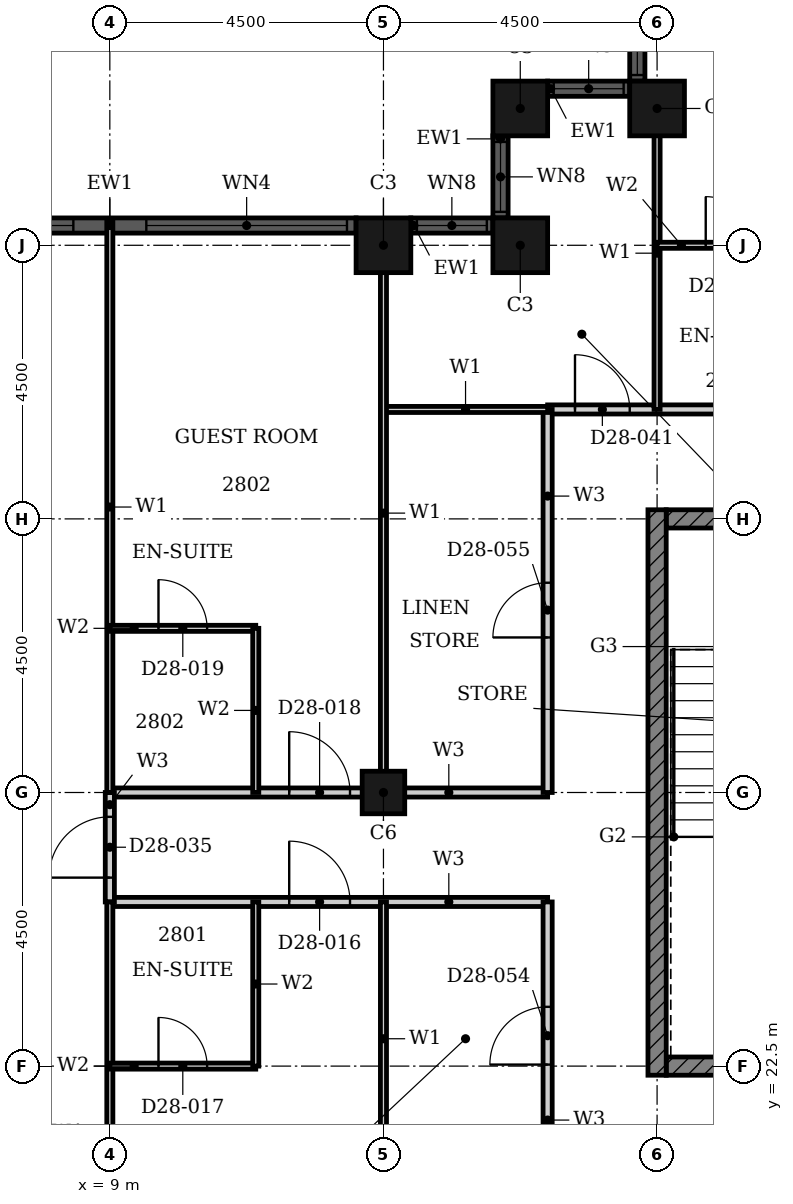
"""IFC4 building model, lengths in metres.
Left out: names, types, materials, properties, quantities, classifications, styles, units other than length and angle.
Written with IfcOpenShell. Run it as: python <this file> out.ifc"""

import sys

from ifc_helpers import new_model, si_unit, direction, frame, frame_2d, origin, origin_2d, place, context, subcontext, project, spatial, rectangle, hollow_rectangle, extrude, element, fill, save


model = new_model("IFC4")
c1 = context("Model", 3, precision=1e-05, world=origin(), true_north=direction((0.0, 1.0)))
c2 = subcontext(c1, "Body", "Model", "MODEL_VIEW")
j1 = project(units=[si_unit("LENGTHUNIT", "METRE"), si_unit("PLANEANGLEUNIT", "RADIAN")], contexts=[c1])
p1 = place(None, origin())
s1 = spatial("IfcSite", under=j1, at=p1, CompositionType="ELEMENT")
p2 = place(p1, origin())
s2 = spatial("IfcBuilding", under=s1, at=p2, CompositionType="ELEMENT")
p3 = place(p2, frame((0.0, 0.0, 115.2)))
s3 = spatial("IfcBuildingStorey", under=s2, at=p3, CompositionType="ELEMENT", Elevation=115.2)
for number, where, z_axis, x_axis in (
    (1, (18.0, 38.25, 0.0), (0.0, 0.0, 1.0), (1.0, 0.0, 0.0)),
    (2, (15.75, 38.25, 0.0), (0.0, 0.0, 1.0), (1.0, 0.0, 0.0)),
    (3, (15.75, 36.0, 0.0), (0.0, 0.0, 1.0), (1.0, 0.0, 0.0)),
    (4, (13.5, 36.0, 0.0), (0.0, 0.0, 1.0), (1.0, 0.0, 0.0)),
):
    element("IfcColumn", number, at=place(p3, frame(where, z_axis=z_axis, x_axis=x_axis)), inside=s3, PredefinedType="COLUMN", context=c2, shape_type="SweptSolid", body=[
        extrude(hollow_rectangle(XDim=0.9, YDim=0.9, WallThickness=0.028, at=origin_2d()), origin(), (0.0, 0.0, 1.0), 3.6),
    ])
p4 = place(p3, frame((13.5, 27.0, 0.0), z_axis=(0.0, 0.0, 1.0), x_axis=(1.0, 0.0, 0.0)))
e5 = element("IfcColumn", 5, at=p4, inside=s3, PredefinedType="COLUMN", context=c2, shape_type="SweptSolid", body=[
    extrude(hollow_rectangle(XDim=0.7, YDim=0.7, WallThickness=0.022, at=origin_2d()), origin(), (0.0, 0.0, 1.0), 3.6),
])
p5 = place(p3, frame((17.675, 40.05, 0.0), z_axis=(0.0, 0.0, 1.0), x_axis=(0.0, -1.0, 0.0)))
e6 = element("IfcWall", 6, at=p5, inside=s3, PredefinedType="SOLIDWALL", context=c2, shape_type="SweptSolid", body=[
    extrude(rectangle(XDim=1.35, YDim=0.25, at=frame_2d((0.675, 0.0))), origin(), (0.0, 0.0, 1.0), 3.6),
])
p6 = place(p5, frame((0.1, 0.0, 0.9)))
e7 = element("IfcOpeningElement", 7, at=p6, cuts=e6, PredefinedType="OPENING", context=c2, shape_type="SweptSolid", body=[
    extrude(rectangle(XDim=1.15, YDim=2.08, at=frame_2d((0.575, 1.04))), frame((0.0, 0.135, 0.0), z_axis=(0.0, -1.0, 0.0), x_axis=(1.0, 0.0, 0.0)), (0.0, 0.0, 1.0), 0.27),
])
p7 = place(p3, frame((17.55, 38.575, 0.0), z_axis=(0.0, 0.0, 1.0), x_axis=(-1.0, 0.0, 0.0)))
e8 = element("IfcWall", 8, at=p7, inside=s3, PredefinedType="SOLIDWALL", context=c2, shape_type="SweptSolid", body=[
    extrude(rectangle(XDim=1.35, YDim=0.25, at=frame_2d((0.675, 0.0))), origin(), (0.0, 0.0, 1.0), 3.6),
])
p8 = place(p7, frame((0.1, 0.0, 0.9)))
e9 = element("IfcOpeningElement", 9, at=p8, cuts=e8, PredefinedType="OPENING", context=c2, shape_type="SweptSolid", body=[
    extrude(rectangle(XDim=1.15, YDim=2.08, at=frame_2d((0.575, 1.04))), frame((0.0, 0.135, 0.0), z_axis=(0.0, -1.0, 0.0), x_axis=(1.0, 0.0, 0.0)), (0.0, 0.0, 1.0), 0.27),
])
p9 = place(p3, frame((15.425, 37.8, 0.0), z_axis=(0.0, 0.0, 1.0), x_axis=(0.0, -1.0, 0.0)))
e10 = element("IfcWall", 10, at=p9, inside=s3, PredefinedType="SOLIDWALL", context=c2, shape_type="SweptSolid", body=[
    extrude(rectangle(XDim=1.35, YDim=0.25, at=frame_2d((0.675, 0.0))), origin(), (0.0, 0.0, 1.0), 3.6),
])
p10 = place(p9, frame((0.1, 0.0, 0.9)))
e11 = element("IfcOpeningElement", 11, at=p10, cuts=e10, PredefinedType="OPENING", context=c2, shape_type="SweptSolid", body=[
    extrude(rectangle(XDim=1.15, YDim=2.08, at=frame_2d((0.575, 1.04))), frame((0.0, 0.135, 0.0), z_axis=(0.0, -1.0, 0.0), x_axis=(1.0, 0.0, 0.0)), (0.0, 0.0, 1.0), 0.27),
])
p11 = place(p3, frame((15.3, 36.325, 0.0), z_axis=(0.0, 0.0, 1.0), x_axis=(-1.0, 0.0, 0.0)))
e12 = element("IfcWall", 12, at=p11, inside=s3, PredefinedType="SOLIDWALL", context=c2, shape_type="SweptSolid", body=[
    extrude(rectangle(XDim=1.35, YDim=0.25, at=frame_2d((0.675, 0.0))), origin(), (0.0, 0.0, 1.0), 3.6),
])
p12 = place(p11, frame((0.1, 0.0, 0.9)))
e13 = element("IfcOpeningElement", 13, at=p12, cuts=e12, PredefinedType="OPENING", context=c2, shape_type="SweptSolid", body=[
    extrude(rectangle(XDim=1.15, YDim=2.08, at=frame_2d((0.575, 1.04))), frame((0.0, 0.135, 0.0), z_axis=(0.0, -1.0, 0.0), x_axis=(1.0, 0.0, 0.0)), (0.0, 0.0, 1.0), 0.27),
])
p13 = place(p3, frame((13.05, 36.325, 0.0), z_axis=(0.0, 0.0, 1.0), x_axis=(-1.0, 0.0, 0.0)))
e14 = element("IfcWall", 14, at=p13, inside=s3, PredefinedType="SOLIDWALL", context=c2, shape_type="SweptSolid", body=[
    extrude(rectangle(XDim=8.1, YDim=0.25, at=frame_2d((4.05, 0.0))), origin(), (0.0, 0.0, 1.0), 3.6),
])
p14 = place(p13, frame((0.15, 0.0, 0.9)))
e15 = element("IfcOpeningElement", 15, at=p14, cuts=e14, PredefinedType="OPENING", context=c2, shape_type="SweptSolid", body=[
    extrude(rectangle(XDim=3.3, YDim=2.08, at=frame_2d((1.65, 1.04))), frame((0.0, 0.135, 0.0), z_axis=(0.0, -1.0, 0.0), x_axis=(1.0, 0.0, 0.0)), (0.0, 0.0, 1.0), 0.27),
])
p15 = place(p13, frame((4.65, 0.0, 0.9)))
e16 = element("IfcOpeningElement", 16, at=p15, cuts=e14, PredefinedType="OPENING", context=c2, shape_type="SweptSolid", body=[
    extrude(rectangle(XDim=3.3, YDim=2.08, at=frame_2d((1.65, 1.04))), frame((0.0, 0.135, 0.0), z_axis=(0.0, -1.0, 0.0), x_axis=(1.0, 0.0, 0.0)), (0.0, 0.0, 1.0), 0.27),
])
p16 = place(p3, frame((18.15, 22.5, 0.0), z_axis=(0.0, 0.0, 1.0), x_axis=(1.0, 0.0, 0.0)))
e17 = element("IfcWall", 17, at=p16, inside=s3, PredefinedType="SHEAR", context=c2, shape_type="SweptSolid", body=[
    extrude(rectangle(XDim=4.225, YDim=0.3, at=frame_2d((2.113, 0.0))), origin(), (0.0, 0.0, 1.0), 3.3),
])
p17 = place(p3, frame((18.15, 31.5, 0.0), z_axis=(0.0, 0.0, 1.0), x_axis=(1.0, 0.0, 0.0)))
e18 = element("IfcWall", 18, at=p17, inside=s3, PredefinedType="SHEAR", context=c2, shape_type="SweptSolid", body=[
    extrude(rectangle(XDim=6.797, YDim=0.3, at=frame_2d((3.398, 0.0))), origin(), (0.0, 0.0, 1.0), 3.3),
])
p18 = place(p17, frame((4.736, 0.0, 0.0)))
e19 = element("IfcOpeningElement", 19, at=p18, cuts=e18, PredefinedType="OPENING", context=c2, shape_type="SweptSolid", body=[
    extrude(rectangle(XDim=1.8, YDim=2.1, at=frame_2d((0.9, 1.05))), frame((0.0, 0.16, 0.0), z_axis=(0.0, -1.0, 0.0), x_axis=(1.0, 0.0, 0.0)), (0.0, 0.0, 1.0), 0.32),
])
p19 = place(p3, frame((18.0, 22.35, 0.0), z_axis=(0.0, 0.0, 1.0), x_axis=(0.0, 1.0, 0.0)))
e20 = element("IfcWall", 20, at=p19, inside=s3, PredefinedType="SHEAR", context=c2, shape_type="SweptSolid", body=[
    extrude(rectangle(XDim=9.3, YDim=0.3, at=frame_2d((4.65, 0.0))), origin(), (0.0, 0.0, 1.0), 3.3),
])
p20 = place(p3, frame((9.0, 25.2, 0.0), z_axis=(0.0, 0.0, 1.0), x_axis=(1.0, 0.0, 0.0)))
e21 = element("IfcWall", 21, at=p20, inside=s3, PredefinedType="PARTITIONING", context=c2, shape_type="SweptSolid", body=[
    extrude(rectangle(XDim=7.2, YDim=0.15, at=frame_2d((3.6, 0.0))), origin(), (0.0, 0.0, 1.0), 3.3),
])
p21 = place(p20, frame((2.95, 0.0, 0.0)))
e22 = element("IfcOpeningElement", 22, at=p21, cuts=e21, PredefinedType="OPENING", context=c2, shape_type="SweptSolid", body=[
    extrude(rectangle(XDim=1.0, YDim=2.1, at=frame_2d((0.5, 1.05))), frame((0.0, 0.085, 0.0), z_axis=(0.0, -1.0, 0.0), x_axis=(1.0, 0.0, 0.0)), (0.0, 0.0, 1.0), 0.17),
])
p22 = place(p3, frame((9.0, 27.0, 0.0), z_axis=(0.0, 0.0, 1.0), x_axis=(1.0, 0.0, 0.0)))
e23 = element("IfcWall", 23, at=p22, inside=s3, PredefinedType="PARTITIONING", context=c2, shape_type="SweptSolid", body=[
    extrude(rectangle(XDim=7.2, YDim=0.15, at=frame_2d((3.6, 0.0))), origin(), (0.0, 0.0, 1.0), 2.58),
])
p23 = place(p22, frame((2.95, 0.0, 0.0)))
e24 = element("IfcOpeningElement", 24, at=p23, cuts=e23, PredefinedType="OPENING", context=c2, shape_type="SweptSolid", body=[
    extrude(rectangle(XDim=1.0, YDim=2.1, at=frame_2d((0.5, 1.05))), frame((0.0, 0.085, 0.0), z_axis=(0.0, -1.0, 0.0), x_axis=(1.0, 0.0, 0.0)), (0.0, 0.0, 1.0), 0.17),
])
p24 = place(p3, frame((16.2, 33.3, 0.0), z_axis=(0.0, 0.0, 1.0), x_axis=(1.0, 0.0, 0.0)))
e25 = element("IfcWall", 25, at=p24, inside=s3, PredefinedType="PARTITIONING", context=c2, shape_type="SweptSolid", body=[
    extrude(rectangle(XDim=15.3, YDim=0.15, at=frame_2d((7.65, 0.0))), origin(), (0.0, 0.0, 1.0), 3.3),
])
p25 = place(p24, frame((4.75, 0.0, 0.0)))
e26 = element("IfcOpeningElement", 26, at=p25, cuts=e25, PredefinedType="OPENING", context=c2, shape_type="SweptSolid", body=[
    extrude(rectangle(XDim=1.0, YDim=2.1, at=frame_2d((0.5, 1.05))), frame((0.0, 0.085, 0.0), z_axis=(0.0, -1.0, 0.0), x_axis=(1.0, 0.0, 0.0)), (0.0, 0.0, 1.0), 0.17),
])
p26 = place(p24, frame((0.45, 0.0, 0.0)))
e27 = element("IfcOpeningElement", 27, at=p26, cuts=e25, PredefinedType="OPENING", context=c2, shape_type="SweptSolid", body=[
    extrude(rectangle(XDim=0.9, YDim=2.1, at=frame_2d((0.45, 1.05))), frame((0.0, 0.085, 0.0), z_axis=(0.0, -1.0, 0.0), x_axis=(1.0, 0.0, 0.0)), (0.0, 0.0, 1.0), 0.17),
])
p27 = place(p24, frame((10.35, 0.0, 0.0)))
e28 = element("IfcOpeningElement", 28, at=p27, cuts=e25, PredefinedType="OPENING", context=c2, shape_type="SweptSolid", body=[
    extrude(rectangle(XDim=0.9, YDim=2.1, at=frame_2d((0.45, 1.05))), frame((0.0, 0.085, 0.0), z_axis=(0.0, -1.0, 0.0), x_axis=(1.0, 0.0, 0.0)), (0.0, 0.0, 1.0), 0.17),
])
p28 = place(p3, frame((16.2, 27.0, 0.0), z_axis=(0.0, 0.0, 1.0), x_axis=(0.0, 1.0, 0.0)))
e29 = element("IfcWall", 29, at=p28, inside=s3, PredefinedType="PARTITIONING", context=c2, shape_type="SweptSolid", body=[
    extrude(rectangle(XDim=6.3, YDim=0.15, at=frame_2d((3.15, 0.0))), origin(), (0.0, 0.0, 1.0), 3.3),
])
p29 = place(p28, frame((2.55, 0.0, 0.0)))
e30 = element("IfcOpeningElement", 30, at=p29, cuts=e29, PredefinedType="OPENING", context=c2, shape_type="SweptSolid", body=[
    extrude(rectangle(XDim=0.9, YDim=2.1, at=frame_2d((0.45, 1.05))), frame((0.0, 0.085, 0.0), z_axis=(0.0, -1.0, 0.0), x_axis=(1.0, 0.0, 0.0)), (0.0, 0.0, 1.0), 0.17),
])
p30 = place(p3, frame((16.2, 20.7, 0.0), z_axis=(0.0, 0.0, 1.0), x_axis=(0.0, 1.0, 0.0)))
e31 = element("IfcWall", 31, at=p30, inside=s3, PredefinedType="PARTITIONING", context=c2, shape_type="SweptSolid", body=[
    extrude(rectangle(XDim=4.5, YDim=0.15, at=frame_2d((2.25, 0.0))), origin(), (0.0, 0.0, 1.0), 3.3),
])
p31 = place(p30, frame((1.825, 0.0, 0.0)))
e32 = element("IfcOpeningElement", 32, at=p31, cuts=e31, PredefinedType="OPENING", context=c2, shape_type="SweptSolid", body=[
    extrude(rectangle(XDim=0.95, YDim=2.1, at=frame_2d((0.475, 1.05))), frame((0.0, 0.085, 0.0), z_axis=(0.0, -1.0, 0.0), x_axis=(1.0, 0.0, 0.0)), (0.0, 0.0, 1.0), 0.17),
])
p32 = place(p3, frame((9.0, 25.2, 0.0), z_axis=(0.0, 0.0, 1.0), x_axis=(0.0, 1.0, 0.0)))
e33 = element("IfcWall", 33, at=p32, inside=s3, PredefinedType="PARTITIONING", context=c2, shape_type="SweptSolid", body=[
    extrude(rectangle(XDim=1.8, YDim=0.15, at=frame_2d((0.9, 0.0))), origin(), (0.0, 0.0, 1.0), 3.3),
])
p33 = place(p32, frame((0.4, 0.0, 0.0)))
e34 = element("IfcOpeningElement", 34, at=p33, cuts=e33, PredefinedType="OPENING", context=c2, shape_type="SweptSolid", body=[
    extrude(rectangle(XDim=1.0, YDim=2.1, at=frame_2d((0.5, 1.05))), frame((0.0, 0.085, 0.0), z_axis=(0.0, -1.0, 0.0), x_axis=(1.0, 0.0, 0.0)), (0.0, 0.0, 1.0), 0.17),
])
p34 = place(p3, frame((13.5, 33.3, 0.0), z_axis=(0.0, 0.0, 1.0), x_axis=(1.0, 0.0, 0.0)))
e35 = element("IfcWall", 35, at=p34, inside=s3, PredefinedType="PARTITIONING", context=c2, shape_type="SweptSolid", body=[
    extrude(rectangle(XDim=2.7, YDim=0.1, at=frame_2d((1.35, 0.0))), origin(), (0.0, 0.0, 1.0), 3.3),
])
p35 = place(p3, frame((13.5, 27.0, 0.0), z_axis=(0.0, 0.0, 1.0), x_axis=(0.0, 1.0, 0.0)))
e36 = element("IfcWall", 36, at=p35, inside=s3, PredefinedType="PARTITIONING", context=c2, shape_type="SweptSolid", body=[
    extrude(rectangle(XDim=9.19, YDim=0.1, at=frame_2d((4.595, 0.0))), origin(), (0.0, 0.0, 1.0), 2.38),
])
p36 = place(p3, frame((13.5, 20.7, 0.0), z_axis=(0.0, 0.0, 1.0), x_axis=(0.0, 1.0, 0.0)))
e37 = element("IfcWall", 37, at=p36, inside=s3, PredefinedType="PARTITIONING", context=c2, shape_type="SweptSolid", body=[
    extrude(rectangle(XDim=4.5, YDim=0.1, at=frame_2d((2.25, 0.0))), origin(), (0.0, 0.0, 1.0), 2.38),
])
p37 = place(p3, frame((18.0, 33.3, 0.0), z_axis=(0.0, 0.0, 1.0), x_axis=(0.0, 1.0, 0.0)))
e38 = element("IfcWall", 38, at=p37, inside=s3, PredefinedType="PARTITIONING", context=c2, shape_type="SweptSolid", body=[
    extrude(rectangle(XDim=5.14, YDim=0.1, at=frame_2d((2.57, 0.0))), origin(), (0.0, 0.0, 1.0), 3.3),
])
p38 = place(p3, frame((9.0, 27.0, 0.0), z_axis=(0.0, 0.0, 1.0), x_axis=(0.0, 1.0, 0.0)))
e39 = element("IfcWall", 39, at=p38, inside=s3, PredefinedType="PARTITIONING", context=c2, shape_type="SweptSolid", body=[
    extrude(rectangle(XDim=9.39, YDim=0.1, at=frame_2d((4.695, 0.0))), origin(), (0.0, 0.0, 1.0), 3.3),
])
p39 = place(p3, frame((9.0, 17.61, 0.0), z_axis=(0.0, 0.0, 1.0), x_axis=(0.0, 1.0, 0.0)))
e40 = element("IfcWall", 40, at=p39, inside=s3, PredefinedType="PARTITIONING", context=c2, shape_type="SweptSolid", body=[
    extrude(rectangle(XDim=7.59, YDim=0.1, at=frame_2d((3.795, 0.0))), origin(), (0.0, 0.0, 1.0), 3.3),
])
p40 = place(p3, frame((9.0, 22.5, 0.0), z_axis=(0.0, 0.0, 1.0), x_axis=(1.0, 0.0, 0.0)))
e41 = element("IfcWall", 41, at=p40, inside=s3, PredefinedType="PARTITIONING", context=c2, shape_type="SweptSolid", body=[
    extrude(rectangle(XDim=2.4, YDim=0.1, at=frame_2d((1.2, 0.0))), origin(), (0.0, 0.0, 1.0), 2.58),
])
p41 = place(p40, frame((0.8, 0.0, 0.0)))
e42 = element("IfcOpeningElement", 42, at=p41, cuts=e41, PredefinedType="OPENING", context=c2, shape_type="SweptSolid", body=[
    extrude(rectangle(XDim=0.8, YDim=2.1, at=frame_2d((0.4, 1.05))), frame((0.0, 0.06, 0.0), z_axis=(0.0, -1.0, 0.0), x_axis=(1.0, 0.0, 0.0)), (0.0, 0.0, 1.0), 0.12),
])
p42 = place(p3, frame((9.0, 29.7, 0.0), z_axis=(0.0, 0.0, 1.0), x_axis=(1.0, 0.0, 0.0)))
e43 = element("IfcWall", 43, at=p42, inside=s3, PredefinedType="PARTITIONING", context=c2, shape_type="SweptSolid", body=[
    extrude(rectangle(XDim=2.4, YDim=0.1, at=frame_2d((1.2, 0.0))), origin(), (0.0, 0.0, 1.0), 3.3),
])
p43 = place(p42, frame((0.8, 0.0, 0.0)))
e44 = element("IfcOpeningElement", 44, at=p43, cuts=e43, PredefinedType="OPENING", context=c2, shape_type="SweptSolid", body=[
    extrude(rectangle(XDim=0.8, YDim=2.1, at=frame_2d((0.4, 1.05))), frame((0.0, 0.06, 0.0), z_axis=(0.0, -1.0, 0.0), x_axis=(1.0, 0.0, 0.0)), (0.0, 0.0, 1.0), 0.12),
])
p44 = place(p3, frame((18.0, 36.0, 0.0), z_axis=(0.0, 0.0, 1.0), x_axis=(1.0, 0.0, 0.0)))
e45 = element("IfcWall", 45, at=p44, inside=s3, PredefinedType="PARTITIONING", context=c2, shape_type="SweptSolid", body=[
    extrude(rectangle(XDim=2.4, YDim=0.1, at=frame_2d((1.2, 0.0))), origin(), (0.0, 0.0, 1.0), 3.3),
])
p45 = place(p44, frame((0.8, 0.0, 0.0)))
e46 = element("IfcOpeningElement", 46, at=p45, cuts=e45, PredefinedType="OPENING", context=c2, shape_type="SweptSolid", body=[
    extrude(rectangle(XDim=0.8, YDim=2.1, at=frame_2d((0.4, 1.05))), frame((0.0, 0.06, 0.0), z_axis=(0.0, -1.0, 0.0), x_axis=(1.0, 0.0, 0.0)), (0.0, 0.0, 1.0), 0.12),
])
for number, where, z_axis, x_axis in (
    (47, (11.4, 27.0, 0.0), (0.0, 0.0, 1.0), (0.0, 1.0, 0.0)),
    (48, (11.4, 22.5, 0.0), (0.0, 0.0, 1.0), (0.0, 1.0, 0.0)),
):
    element("IfcWall", number, at=place(p3, frame(where, z_axis=z_axis, x_axis=x_axis)), inside=s3, PredefinedType="PARTITIONING", context=c2, shape_type="SweptSolid", body=[
        extrude(rectangle(XDim=2.7, YDim=0.1, at=frame_2d((1.35, 0.0))), origin(), (0.0, 0.0, 1.0), 3.3),
    ])
p46 = place(p6, origin())
e49 = element("IfcWindow", 49, at=p46, inside=s3, PartitioningType="SINGLE_PANEL", PredefinedType="WINDOW", context=c2, shape_type="SweptSolid", body=[
    extrude(rectangle(XDim=1.15, YDim=2.08, at=frame_2d((0.575, 1.04))), frame((0.0, 0.03, 0.0), z_axis=(0.0, -1.0, 0.0), x_axis=(1.0, 0.0, 0.0)), (0.0, 0.0, 1.0), 0.06),
])
fill(e7, e49)
p47 = place(p8, origin())
e50 = element("IfcWindow", 50, at=p47, inside=s3, PartitioningType="SINGLE_PANEL", PredefinedType="WINDOW", context=c2, shape_type="SweptSolid", body=[
    extrude(rectangle(XDim=1.15, YDim=2.08, at=frame_2d((0.575, 1.04))), frame((0.0, 0.03, 0.0), z_axis=(0.0, -1.0, 0.0), x_axis=(1.0, 0.0, 0.0)), (0.0, 0.0, 1.0), 0.06),
])
fill(e9, e50)
p48 = place(p10, origin())
e51 = element("IfcWindow", 51, at=p48, inside=s3, PartitioningType="SINGLE_PANEL", PredefinedType="WINDOW", context=c2, shape_type="SweptSolid", body=[
    extrude(rectangle(XDim=1.15, YDim=2.08, at=frame_2d((0.575, 1.04))), frame((0.0, 0.03, 0.0), z_axis=(0.0, -1.0, 0.0), x_axis=(1.0, 0.0, 0.0)), (0.0, 0.0, 1.0), 0.06),
])
fill(e11, e51)
p49 = place(p12, origin())
e52 = element("IfcWindow", 52, at=p49, inside=s3, PartitioningType="SINGLE_PANEL", PredefinedType="WINDOW", context=c2, shape_type="SweptSolid", body=[
    extrude(rectangle(XDim=1.15, YDim=2.08, at=frame_2d((0.575, 1.04))), frame((0.0, 0.03, 0.0), z_axis=(0.0, -1.0, 0.0), x_axis=(1.0, 0.0, 0.0)), (0.0, 0.0, 1.0), 0.06),
])
fill(e13, e52)
p50 = place(p14, origin())
e53 = element("IfcWindow", 53, at=p50, inside=s3, PartitioningType="SINGLE_PANEL", PredefinedType="WINDOW", context=c2, shape_type="SweptSolid", body=[
    extrude(rectangle(XDim=3.3, YDim=2.08, at=frame_2d((1.65, 1.04))), frame((0.0, 0.03, 0.0), z_axis=(0.0, -1.0, 0.0), x_axis=(1.0, 0.0, 0.0)), (0.0, 0.0, 1.0), 0.06),
])
fill(e15, e53)
p51 = place(p15, origin())
e54 = element("IfcWindow", 54, at=p51, inside=s3, PartitioningType="SINGLE_PANEL", PredefinedType="WINDOW", context=c2, shape_type="SweptSolid", body=[
    extrude(rectangle(XDim=3.3, YDim=2.08, at=frame_2d((1.65, 1.04))), frame((0.0, 0.03, 0.0), z_axis=(0.0, -1.0, 0.0), x_axis=(1.0, 0.0, 0.0)), (0.0, 0.0, 1.0), 0.06),
])
fill(e16, e54)
p52 = place(p21, origin())
e55 = element("IfcDoor", 55, at=p52, inside=s3, OperationType="SINGLE_SWING_RIGHT", PredefinedType="DOOR", context=c2, shape_type="SweptSolid", body=[
    extrude(rectangle(XDim=1.0, YDim=2.1, at=frame_2d((0.5, 1.05))), frame((0.0, 0.025, 0.0), z_axis=(0.0, -1.0, 0.0), x_axis=(1.0, 0.0, 0.0)), (0.0, 0.0, 1.0), 0.05),
])
fill(e22, e55)
p53 = place(p41, origin())
e56 = element("IfcDoor", 56, at=p53, inside=s3, OperationType="SINGLE_SWING_RIGHT", PredefinedType="DOOR", context=c2, shape_type="SweptSolid", body=[
    extrude(rectangle(XDim=0.8, YDim=2.1, at=frame_2d((0.4, 1.05))), frame((0.0, 0.025, 0.0), z_axis=(0.0, -1.0, 0.0), x_axis=(1.0, 0.0, 0.0)), (0.0, 0.0, 1.0), 0.05),
])
fill(e42, e56)
p54 = place(p23, origin())
e57 = element("IfcDoor", 57, at=p54, inside=s3, OperationType="SINGLE_SWING_RIGHT", PredefinedType="DOOR", context=c2, shape_type="SweptSolid", body=[
    extrude(rectangle(XDim=1.0, YDim=2.1, at=frame_2d((0.5, 1.05))), frame((0.0, 0.025, 0.0), z_axis=(0.0, -1.0, 0.0), x_axis=(1.0, 0.0, 0.0)), (0.0, 0.0, 1.0), 0.05),
])
fill(e24, e57)
p55 = place(p43, origin())
e58 = element("IfcDoor", 58, at=p55, inside=s3, OperationType="SINGLE_SWING_LEFT", PredefinedType="DOOR", context=c2, shape_type="SweptSolid", body=[
    extrude(rectangle(XDim=0.8, YDim=2.1, at=frame_2d((0.4, 1.05))), frame((0.0, 0.025, 0.0), z_axis=(0.0, -1.0, 0.0), x_axis=(1.0, 0.0, 0.0)), (0.0, 0.0, 1.0), 0.05),
])
fill(e44, e58)
p56 = place(p33, origin())
e59 = element("IfcDoor", 59, at=p56, inside=s3, OperationType="SINGLE_SWING_LEFT", PredefinedType="DOOR", context=c2, shape_type="SweptSolid", body=[
    extrude(rectangle(XDim=1.0, YDim=2.1, at=frame_2d((0.5, 1.05))), frame((0.0, 0.025, 0.0), z_axis=(0.0, -1.0, 0.0), x_axis=(1.0, 0.0, 0.0)), (0.0, 0.0, 1.0), 0.05),
])
fill(e34, e59)
p57 = place(p45, origin())
e60 = element("IfcDoor", 60, at=p57, inside=s3, OperationType="SINGLE_SWING_RIGHT", PredefinedType="DOOR", context=c2, shape_type="SweptSolid", body=[
    extrude(rectangle(XDim=0.8, YDim=2.1, at=frame_2d((0.4, 1.05))), frame((0.0, 0.025, 0.0), z_axis=(0.0, -1.0, 0.0), x_axis=(1.0, 0.0, 0.0)), (0.0, 0.0, 1.0), 0.05),
])
fill(e46, e60)
p58 = place(p26, origin())
e61 = element("IfcDoor", 61, at=p58, inside=s3, OperationType="SINGLE_SWING_RIGHT", PredefinedType="DOOR", context=c2, shape_type="SweptSolid", body=[
    extrude(rectangle(XDim=0.9, YDim=2.1, at=frame_2d((0.45, 1.05))), frame((0.0, 0.025, 0.0), z_axis=(0.0, -1.0, 0.0), x_axis=(1.0, 0.0, 0.0)), (0.0, 0.0, 1.0), 0.05),
])
fill(e27, e61)
p59 = place(p31, origin())
e62 = element("IfcDoor", 62, at=p59, inside=s3, OperationType="SINGLE_SWING_LEFT", PredefinedType="DOOR", context=c2, shape_type="SweptSolid", body=[
    extrude(rectangle(XDim=0.95, YDim=2.1, at=frame_2d((0.475, 1.05))), frame((0.0, 0.025, 0.0), z_axis=(0.0, -1.0, 0.0), x_axis=(1.0, 0.0, 0.0)), (0.0, 0.0, 1.0), 0.05),
])
fill(e32, e62)
p60 = place(p29, origin())
e63 = element("IfcDoor", 63, at=p60, inside=s3, OperationType="SINGLE_SWING_LEFT", PredefinedType="DOOR", context=c2, shape_type="SweptSolid", body=[
    extrude(rectangle(XDim=0.9, YDim=2.1, at=frame_2d((0.45, 1.05))), frame((0.0, 0.025, 0.0), z_axis=(0.0, -1.0, 0.0), x_axis=(1.0, 0.0, 0.0)), (0.0, 0.0, 1.0), 0.05),
])
fill(e30, e63)
save(model, sys.argv[1])
